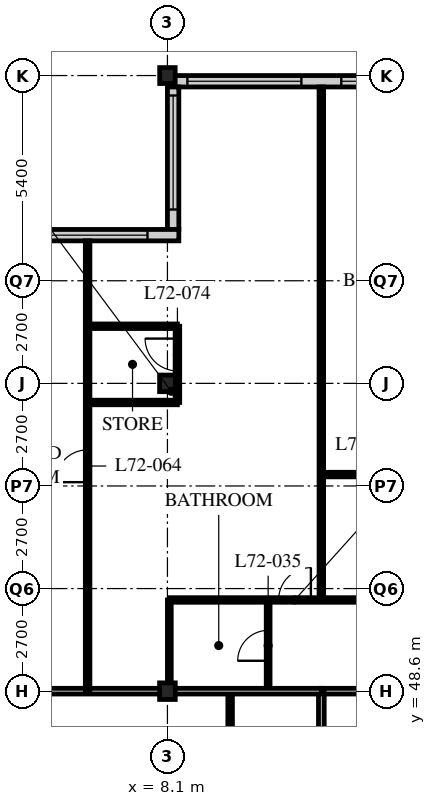
"""IFC4 building model, lengths in metres.
Left out: names, types, materials, properties, quantities, classifications, styles, units other than length and angle.
Written with IfcOpenShell. Run it as: python <this file> out.ifc"""

import sys

from ifc_helpers import new_model, si_unit, direction, frame, frame_2d, origin, origin_2d, place, context, subcontext, project, spatial, rectangle, i_section, extrude, element, fill, save


model = new_model("IFC4")
c1 = context("Model", 3, precision=1e-05, world=origin(), true_north=direction((0.0, 1.0)))
c2 = subcontext(c1, "Body", "Model", "MODEL_VIEW")
j1 = project(units=[si_unit("LENGTHUNIT", "METRE"), si_unit("PLANEANGLEUNIT", "RADIAN")], contexts=[c1])
p1 = place(None, origin())
s1 = spatial("IfcSite", under=j1, at=p1, CompositionType="ELEMENT")
p2 = place(p1, origin())
s2 = spatial("IfcBuilding", under=s1, at=p2, CompositionType="ELEMENT")
p3 = place(p2, frame((0.0, 0.0, 281.4)))
s3 = spatial("IfcBuildingStorey", under=s2, at=p3, CompositionType="ELEMENT", Elevation=281.4)
for number, where, z_axis, x_axis in (
    (1, (8.1, 48.6, 0.0), (0.0, 0.0, 1.0), (1.0, 0.0, 0.0)),
    (2, (8.1, 56.7, 0.0), (0.0, 0.0, 1.0), (1.0, 0.0, 0.0)),
):
    element("IfcColumn", number, at=place(p3, frame(where, z_axis=z_axis, x_axis=x_axis)), inside=s3, PredefinedType="COLUMN", context=c2, shape_type="SweptSolid", body=[
        extrude(i_section(OverallWidth=0.412, OverallDepth=0.437, WebThickness=0.036, FlangeThickness=0.058, FilletRadius=0.015, at=origin_2d()), origin(), (0.0, 0.0, 1.0), 3.9),
    ])
p4 = place(p3, frame((8.1, 64.8, 0.0), z_axis=(0.0, 0.0, 1.0), x_axis=(1.0, 0.0, 0.0)))
e3 = element("IfcColumn", 3, at=p4, inside=s3, PredefinedType="COLUMN", context=c2, shape_type="SweptSolid", body=[
    extrude(i_section(OverallWidth=0.407, OverallDepth=0.419, WebThickness=0.031, FlangeThickness=0.049, FilletRadius=0.015, at=origin_2d()), origin(), (0.0, 0.0, 1.0), 3.9),
])
p5 = place(p3, frame((48.3, 64.65, 0.0), z_axis=(0.0, 0.0, 1.0), x_axis=(-1.0, 0.0, 0.0)))
e4 = element("IfcWall", 4, at=p5, inside=s3, PredefinedType="SOLIDWALL", context=c2, shape_type="SweptSolid", body=[
    extrude(rectangle(XDim=40.2, YDim=0.3, at=frame_2d((20.1, 0.0))), origin(), (0.0, 0.0, 1.0), 3.69),
])
p6 = place(p5, frame((0.225, 0.0, 0.6)))
e5 = element("IfcOpeningElement", 5, at=p6, cuts=e4, PredefinedType="OPENING", context=c2, shape_type="SweptSolid", body=[
    extrude(rectangle(XDim=3.0, YDim=2.4, at=frame_2d((1.5, 1.2))), frame((0.0, 0.16, 0.0), z_axis=(0.0, -1.0, 0.0), x_axis=(1.0, 0.0, 0.0)), (0.0, 0.0, 1.0), 0.32),
])
p7 = place(p5, frame((4.275, 0.0, 0.6)))
e6 = element("IfcOpeningElement", 6, at=p7, cuts=e4, PredefinedType="OPENING", context=c2, shape_type="SweptSolid", body=[
    extrude(rectangle(XDim=3.0, YDim=2.4, at=frame_2d((1.5, 1.2))), frame((0.0, 0.16, 0.0), z_axis=(0.0, -1.0, 0.0), x_axis=(1.0, 0.0, 0.0)), (0.0, 0.0, 1.0), 0.32),
])
p8 = place(p5, frame((8.325, 0.0, 0.6)))
e7 = element("IfcOpeningElement", 7, at=p8, cuts=e4, PredefinedType="OPENING", context=c2, shape_type="SweptSolid", body=[
    extrude(rectangle(XDim=3.0, YDim=2.4, at=frame_2d((1.5, 1.2))), frame((0.0, 0.16, 0.0), z_axis=(0.0, -1.0, 0.0), x_axis=(1.0, 0.0, 0.0)), (0.0, 0.0, 1.0), 0.32),
])
p9 = place(p5, frame((12.375, 0.0, 0.6)))
e8 = element("IfcOpeningElement", 8, at=p9, cuts=e4, PredefinedType="OPENING", context=c2, shape_type="SweptSolid", body=[
    extrude(rectangle(XDim=3.0, YDim=2.4, at=frame_2d((1.5, 1.2))), frame((0.0, 0.16, 0.0), z_axis=(0.0, -1.0, 0.0), x_axis=(1.0, 0.0, 0.0)), (0.0, 0.0, 1.0), 0.32),
])
p10 = place(p5, frame((16.425, 0.0, 0.6)))
e9 = element("IfcOpeningElement", 9, at=p10, cuts=e4, PredefinedType="OPENING", context=c2, shape_type="SweptSolid", body=[
    extrude(rectangle(XDim=3.0, YDim=2.4, at=frame_2d((1.5, 1.2))), frame((0.0, 0.16, 0.0), z_axis=(0.0, -1.0, 0.0), x_axis=(1.0, 0.0, 0.0)), (0.0, 0.0, 1.0), 0.32),
])
p11 = place(p5, frame((20.475, 0.0, 0.6)))
e10 = element("IfcOpeningElement", 10, at=p11, cuts=e4, PredefinedType="OPENING", context=c2, shape_type="SweptSolid", body=[
    extrude(rectangle(XDim=3.0, YDim=2.4, at=frame_2d((1.5, 1.2))), frame((0.0, 0.16, 0.0), z_axis=(0.0, -1.0, 0.0), x_axis=(1.0, 0.0, 0.0)), (0.0, 0.0, 1.0), 0.32),
])
p12 = place(p5, frame((24.525, 0.0, 0.6)))
e11 = element("IfcOpeningElement", 11, at=p12, cuts=e4, PredefinedType="OPENING", context=c2, shape_type="SweptSolid", body=[
    extrude(rectangle(XDim=3.0, YDim=2.4, at=frame_2d((1.5, 1.2))), frame((0.0, 0.16, 0.0), z_axis=(0.0, -1.0, 0.0), x_axis=(1.0, 0.0, 0.0)), (0.0, 0.0, 1.0), 0.32),
])
p13 = place(p5, frame((28.575, 0.0, 0.6)))
e12 = element("IfcOpeningElement", 12, at=p13, cuts=e4, PredefinedType="OPENING", context=c2, shape_type="SweptSolid", body=[
    extrude(rectangle(XDim=3.0, YDim=2.4, at=frame_2d((1.5, 1.2))), frame((0.0, 0.16, 0.0), z_axis=(0.0, -1.0, 0.0), x_axis=(1.0, 0.0, 0.0)), (0.0, 0.0, 1.0), 0.32),
])
p14 = place(p5, frame((32.625, 0.0, 0.6)))
e13 = element("IfcOpeningElement", 13, at=p14, cuts=e4, PredefinedType="OPENING", context=c2, shape_type="SweptSolid", body=[
    extrude(rectangle(XDim=3.0, YDim=2.4, at=frame_2d((1.5, 1.2))), frame((0.0, 0.16, 0.0), z_axis=(0.0, -1.0, 0.0), x_axis=(1.0, 0.0, 0.0)), (0.0, 0.0, 1.0), 0.32),
])
p15 = place(p5, frame((36.675, 0.0, 0.6)))
e14 = element("IfcOpeningElement", 14, at=p15, cuts=e4, PredefinedType="OPENING", context=c2, shape_type="SweptSolid", body=[
    extrude(rectangle(XDim=3.0, YDim=2.4, at=frame_2d((1.5, 1.2))), frame((0.0, 0.16, 0.0), z_axis=(0.0, -1.0, 0.0), x_axis=(1.0, 0.0, 0.0)), (0.0, 0.0, 1.0), 0.32),
])
p16 = place(p3, frame((8.25, 64.5, 0.0), z_axis=(0.0, 0.0, 1.0), x_axis=(0.0, -1.0, 0.0)))
e15 = element("IfcWall", 15, at=p16, inside=s3, PredefinedType="SOLIDWALL", context=c2, shape_type="SweptSolid", body=[
    extrude(rectangle(XDim=3.75, YDim=0.3, at=frame_2d((1.875, 0.0))), origin(), (0.0, 0.0, 1.0), 3.69),
])
p17 = place(p16, frame((0.225, 0.0, 0.6)))
e16 = element("IfcOpeningElement", 16, at=p17, cuts=e15, PredefinedType="OPENING", context=c2, shape_type="SweptSolid", body=[
    extrude(rectangle(XDim=3.0, YDim=2.3, at=frame_2d((1.5, 1.15))), frame((0.0, 0.16, 0.0), z_axis=(0.0, -1.0, 0.0), x_axis=(1.0, 0.0, 0.0)), (0.0, 0.0, 1.0), 0.32),
])
p18 = place(p3, frame((8.4, 60.6, 0.0), z_axis=(0.0, 0.0, 1.0), x_axis=(-1.0, 0.0, 0.0)))
e17 = element("IfcWall", 17, at=p18, inside=s3, PredefinedType="SOLIDWALL", context=c2, shape_type="SweptSolid", body=[
    extrude(rectangle(XDim=4.35, YDim=0.3, at=frame_2d((2.175, 0.0))), origin(), (0.0, 0.0, 1.0), 3.69),
])
p19 = place(p18, frame((0.825, 0.0, 0.6)))
e18 = element("IfcOpeningElement", 18, at=p19, cuts=e17, PredefinedType="OPENING", context=c2, shape_type="SweptSolid", body=[
    extrude(rectangle(XDim=3.0, YDim=2.3, at=frame_2d((1.5, 1.15))), frame((0.0, 0.16, 0.0), z_axis=(0.0, -1.0, 0.0), x_axis=(1.0, 0.0, 0.0)), (0.0, 0.0, 1.0), 0.32),
])
p20 = place(p3, frame((12.15, 48.6, 0.0), z_axis=(0.0, 0.0, 1.0), x_axis=(1.0, 0.0, 0.0)))
e19 = element("IfcWall", 19, at=p20, inside=s3, PredefinedType="PARTITIONING", context=c2, shape_type="SweptSolid", body=[
    extrude(rectangle(XDim=24.3, YDim=0.15, at=frame_2d((12.15, 0.0))), origin(), (0.0, 0.0, 1.0), 3.078),
])
p21 = place(p20, frame((4.95, 0.0, 0.0)))
e20 = element("IfcOpeningElement", 20, at=p21, cuts=e19, PredefinedType="OPENING", context=c2, shape_type="SweptSolid", body=[
    extrude(rectangle(XDim=1.0, YDim=2.1, at=frame_2d((0.5, 1.05))), frame((0.0, 0.085, 0.0), z_axis=(0.0, -1.0, 0.0), x_axis=(1.0, 0.0, 0.0)), (0.0, 0.0, 1.0), 0.17),
])
p22 = place(p20, frame((16.6, 0.0, 0.0)))
e21 = element("IfcOpeningElement", 21, at=p22, cuts=e19, PredefinedType="OPENING", context=c2, shape_type="SweptSolid", body=[
    extrude(rectangle(XDim=1.0, YDim=2.1, at=frame_2d((0.5, 1.05))), frame((0.0, 0.085, 0.0), z_axis=(0.0, -1.0, 0.0), x_axis=(1.0, 0.0, 0.0)), (0.0, 0.0, 1.0), 0.17),
])
p23 = place(p20, frame((1.525, 0.0, 0.0)))
e22 = element("IfcOpeningElement", 22, at=p23, cuts=e19, PredefinedType="OPENING", context=c2, shape_type="SweptSolid", body=[
    extrude(rectangle(XDim=1.0, YDim=2.1, at=frame_2d((0.5, 1.05))), frame((0.0, 0.085, 0.0), z_axis=(0.0, -1.0, 0.0), x_axis=(1.0, 0.0, 0.0)), (0.0, 0.0, 1.0), 0.17),
])
p24 = place(p3, frame((12.15, 22.5, 0.0), z_axis=(0.0, 0.0, 1.0), x_axis=(0.0, 1.0, 0.0)))
e23 = element("IfcWall", 23, at=p24, inside=s3, PredefinedType="PARTITIONING", context=c2, shape_type="SweptSolid", body=[
    extrude(rectangle(XDim=26.1, YDim=0.15, at=frame_2d((13.05, 0.0))), origin(), (0.0, 0.0, 1.0), 3.69),
])
p25 = place(p24, frame((0.4, 0.0, 0.0)))
e24 = element("IfcOpeningElement", 24, at=p25, cuts=e23, PredefinedType="OPENING", context=c2, shape_type="SweptSolid", body=[
    extrude(rectangle(XDim=1.0, YDim=2.1, at=frame_2d((0.5, 1.05))), frame((0.0, 0.085, 0.0), z_axis=(0.0, -1.0, 0.0), x_axis=(1.0, 0.0, 0.0)), (0.0, 0.0, 1.0), 0.17),
])
p26 = place(p3, frame((9.75, 22.5, 0.0), z_axis=(0.0, 0.0, 1.0), x_axis=(0.0, 1.0, 0.0)))
e25 = element("IfcWall", 25, at=p26, inside=s3, PredefinedType="PARTITIONING", context=c2, shape_type="SweptSolid", body=[
    extrude(rectangle(XDim=26.1, YDim=0.12, at=frame_2d((13.05, 0.0))), origin(), (0.0, 0.0, 1.0), 3.69),
])
p27 = place(p26, frame((0.975, 0.0, 0.0)))
e26 = element("IfcOpeningElement", 26, at=p27, cuts=e25, PredefinedType="OPENING", context=c2, shape_type="SweptSolid", body=[
    extrude(rectangle(XDim=0.85, YDim=2.1, at=frame_2d((0.425, 1.05))), frame((0.0, 0.07, 0.0), z_axis=(0.0, -1.0, 0.0), x_axis=(1.0, 0.0, 0.0)), (0.0, 0.0, 1.0), 0.14),
])
p28 = place(p26, frame((10.225, 0.0, 0.0)))
e27 = element("IfcOpeningElement", 27, at=p28, cuts=e25, PredefinedType="OPENING", context=c2, shape_type="SweptSolid", body=[
    extrude(rectangle(XDim=0.85, YDim=2.1, at=frame_2d((0.425, 1.05))), frame((0.0, 0.07, 0.0), z_axis=(0.0, -1.0, 0.0), x_axis=(1.0, 0.0, 0.0)), (0.0, 0.0, 1.0), 0.14),
])
p29 = place(p26, frame((14.275, 0.0, 0.0)))
e28 = element("IfcOpeningElement", 28, at=p29, cuts=e25, PredefinedType="OPENING", context=c2, shape_type="SweptSolid", body=[
    extrude(rectangle(XDim=0.85, YDim=2.1, at=frame_2d((0.425, 1.05))), frame((0.0, 0.07, 0.0), z_axis=(0.0, -1.0, 0.0), x_axis=(1.0, 0.0, 0.0)), (0.0, 0.0, 1.0), 0.14),
])
p30 = place(p26, frame((18.325, 0.0, 0.0)))
e29 = element("IfcOpeningElement", 29, at=p30, cuts=e25, PredefinedType="OPENING", context=c2, shape_type="SweptSolid", body=[
    extrude(rectangle(XDim=0.85, YDim=2.1, at=frame_2d((0.425, 1.05))), frame((0.0, 0.07, 0.0), z_axis=(0.0, -1.0, 0.0), x_axis=(1.0, 0.0, 0.0)), (0.0, 0.0, 1.0), 0.14),
])
p31 = place(p26, frame((22.375, 0.0, 0.0)))
e30 = element("IfcOpeningElement", 30, at=p31, cuts=e25, PredefinedType="OPENING", context=c2, shape_type="SweptSolid", body=[
    extrude(rectangle(XDim=0.85, YDim=2.1, at=frame_2d((0.425, 1.05))), frame((0.0, 0.07, 0.0), z_axis=(0.0, -1.0, 0.0), x_axis=(1.0, 0.0, 0.0)), (0.0, 0.0, 1.0), 0.14),
])
p32 = place(p3, frame((10.75, 48.6, 0.0), z_axis=(0.0, 0.0, 1.0), x_axis=(0.0, 1.0, 0.0)))
e31 = element("IfcWall", 31, at=p32, inside=s3, PredefinedType="PARTITIONING", context=c2, shape_type="SweptSolid", body=[
    extrude(rectangle(XDim=2.4, YDim=0.1, at=frame_2d((1.2, 0.0))), origin(), (0.0, 0.0, 1.0), 3.69),
])
p33 = place(p32, frame((0.8, 0.0, 0.0)))
e32 = element("IfcOpeningElement", 32, at=p33, cuts=e31, PredefinedType="OPENING", context=c2, shape_type="SweptSolid", body=[
    extrude(rectangle(XDim=0.8, YDim=2.1, at=frame_2d((0.4, 1.05))), frame((0.0, 0.06, 0.0), z_axis=(0.0, -1.0, 0.0), x_axis=(1.0, 0.0, 0.0)), (0.0, 0.0, 1.0), 0.12),
])
p34 = place(p3, frame((8.15, 48.6, 0.0), z_axis=(0.0, 0.0, 1.0), x_axis=(0.0, 1.0, 0.0)))
e33 = element("IfcWall", 33, at=p34, inside=s3, PredefinedType="PARTITIONING", context=c2, shape_type="SweptSolid", body=[
    extrude(rectangle(XDim=2.4, YDim=0.1, at=frame_2d((1.2, 0.0))), origin(), (0.0, 0.0, 1.0), 3.078),
])
p35 = place(p3, frame((8.15, 51.0, 0.0), z_axis=(0.0, 0.0, 1.0), x_axis=(1.0, 0.0, 0.0)))
e34 = element("IfcWall", 34, at=p35, inside=s3, PredefinedType="PARTITIONING", context=c2, shape_type="SweptSolid", body=[
    extrude(rectangle(XDim=28.3, YDim=0.12, at=frame_2d((14.15, 0.0))), origin(), (0.0, 0.0, 1.0), 3.69),
])
p36 = place(p35, frame((9.025, 0.0, 0.0)))
e35 = element("IfcOpeningElement", 35, at=p36, cuts=e34, PredefinedType="OPENING", context=c2, shape_type="SweptSolid", body=[
    extrude(rectangle(XDim=0.85, YDim=2.1, at=frame_2d((0.425, 1.05))), frame((0.0, 0.07, 0.0), z_axis=(0.0, -1.0, 0.0), x_axis=(1.0, 0.0, 0.0)), (0.0, 0.0, 1.0), 0.14),
])
p37 = place(p35, frame((16.475, 0.0, 0.0)))
e36 = element("IfcOpeningElement", 36, at=p37, cuts=e34, PredefinedType="OPENING", context=c2, shape_type="SweptSolid", body=[
    extrude(rectangle(XDim=0.85, YDim=2.1, at=frame_2d((0.425, 1.05))), frame((0.0, 0.07, 0.0), z_axis=(0.0, -1.0, 0.0), x_axis=(1.0, 0.0, 0.0)), (0.0, 0.0, 1.0), 0.14),
])
p38 = place(p35, frame((21.175, 0.0, 0.0)))
e37 = element("IfcOpeningElement", 37, at=p38, cuts=e34, PredefinedType="OPENING", context=c2, shape_type="SweptSolid", body=[
    extrude(rectangle(XDim=0.85, YDim=2.1, at=frame_2d((0.425, 1.05))), frame((0.0, 0.07, 0.0), z_axis=(0.0, -1.0, 0.0), x_axis=(1.0, 0.0, 0.0)), (0.0, 0.0, 1.0), 0.14),
])
p39 = place(p35, frame((24.575, 0.0, 0.0)))
e38 = element("IfcOpeningElement", 38, at=p39, cuts=e34, PredefinedType="OPENING", context=c2, shape_type="SweptSolid", body=[
    extrude(rectangle(XDim=0.85, YDim=2.1, at=frame_2d((0.425, 1.05))), frame((0.0, 0.07, 0.0), z_axis=(0.0, -1.0, 0.0), x_axis=(1.0, 0.0, 0.0)), (0.0, 0.0, 1.0), 0.14),
])
p40 = place(p35, frame((6.725, 0.0, 0.0)))
e39 = element("IfcOpeningElement", 39, at=p40, cuts=e34, PredefinedType="OPENING", context=c2, shape_type="SweptSolid", body=[
    extrude(rectangle(XDim=0.85, YDim=2.1, at=frame_2d((0.425, 1.05))), frame((0.0, 0.07, 0.0), z_axis=(0.0, -1.0, 0.0), x_axis=(1.0, 0.0, 0.0)), (0.0, 0.0, 1.0), 0.14),
])
p41 = place(p35, frame((2.875, 0.0, 0.0)))
e40 = element("IfcOpeningElement", 40, at=p41, cuts=e34, PredefinedType="OPENING", context=c2, shape_type="SweptSolid", body=[
    extrude(rectangle(XDim=0.85, YDim=2.1, at=frame_2d((0.425, 1.05))), frame((0.0, 0.07, 0.0), z_axis=(0.0, -1.0, 0.0), x_axis=(1.0, 0.0, 0.0)), (0.0, 0.0, 1.0), 0.14),
])
p42 = place(p3, frame((12.15, 51.0, 0.0), z_axis=(0.0, 0.0, 1.0), x_axis=(0.0, 1.0, 0.0)))
e41 = element("IfcWall", 41, at=p42, inside=s3, PredefinedType="PARTITIONING", context=c2, shape_type="SweptSolid", body=[
    extrude(rectangle(XDim=13.5, YDim=0.12, at=frame_2d((6.75, 0.0))), origin(), (0.0, 0.0, 1.0), 3.69),
])
p43 = place(p3, frame((0.3, 48.6, 0.0), z_axis=(0.0, 0.0, 1.0), x_axis=(1.0, 0.0, 0.0)))
e42 = element("IfcWall", 42, at=p43, inside=s3, PredefinedType="PARTITIONING", context=c2, shape_type="SweptSolid", body=[
    extrude(rectangle(XDim=11.85, YDim=0.15, at=frame_2d((5.925, 0.0))), origin(), (0.0, 0.0, 1.0), 3.078),
])
p44 = place(p3, frame((12.15, 54.3, 0.0), z_axis=(0.0, 0.0, 1.0), x_axis=(1.0, 0.0, 0.0)))
e43 = element("IfcWall", 43, at=p44, inside=s3, PredefinedType="PARTITIONING", context=c2, shape_type="SweptSolid", body=[
    extrude(rectangle(XDim=4.05, YDim=0.12, at=frame_2d((2.025, 0.0))), origin(), (0.0, 0.0, 1.0), 3.69),
])
p45 = place(p44, frame((1.6, 0.0, 0.0)))
e44 = element("IfcOpeningElement", 44, at=p45, cuts=e43, PredefinedType="OPENING", context=c2, shape_type="SweptSolid", body=[
    extrude(rectangle(XDim=0.85, YDim=2.1, at=frame_2d((0.425, 1.05))), frame((0.0, 0.07, 0.0), z_axis=(0.0, -1.0, 0.0), x_axis=(1.0, 0.0, 0.0)), (0.0, 0.0, 1.0), 0.14),
])
p46 = place(p3, frame((6.0, 48.6, 0.0), z_axis=(0.0, 0.0, 1.0), x_axis=(0.0, 1.0, 0.0)))
e45 = element("IfcWall", 45, at=p46, inside=s3, PredefinedType="PARTITIONING", context=c2, shape_type="SweptSolid", body=[
    extrude(rectangle(XDim=11.85, YDim=0.12, at=frame_2d((5.925, 0.0))), origin(), (0.0, 0.0, 1.0), 3.69),
])
p47 = place(p46, frame((5.5, 0.0, 0.0)))
e46 = element("IfcOpeningElement", 46, at=p47, cuts=e45, PredefinedType="OPENING", context=c2, shape_type="SweptSolid", body=[
    extrude(rectangle(XDim=0.85, YDim=2.1, at=frame_2d((0.425, 1.05))), frame((0.0, 0.07, 0.0), z_axis=(0.0, -1.0, 0.0), x_axis=(1.0, 0.0, 0.0)), (0.0, 0.0, 1.0), 0.14),
])
for number, where, z_axis, x_axis in (
    (47, (6.0, 56.197, 0.0), (0.0, 0.0, 1.0), (1.0, 0.0, 0.0)),
    (48, (6.0, 58.203, 0.0), (0.0, 0.0, 1.0), (1.0, 0.0, 0.0)),
):
    element("IfcWall", number, at=place(p3, frame(where, z_axis=z_axis, x_axis=x_axis)), inside=s3, PredefinedType="PARTITIONING", context=c2, shape_type="SweptSolid", body=[
        extrude(rectangle(XDim=2.363, YDim=0.12, at=frame_2d((1.182, 0.0))), origin(), (0.0, 0.0, 1.0), 3.69),
    ])
p48 = place(p3, frame((8.363, 56.197, 0.0), z_axis=(0.0, 0.0, 1.0), x_axis=(0.0, 1.0, 0.0)))
e49 = element("IfcWall", 49, at=p48, inside=s3, PredefinedType="PARTITIONING", context=c2, shape_type="SweptSolid", body=[
    extrude(rectangle(XDim=2.006, YDim=0.12, at=frame_2d((1.003, 0.0))), origin(), (0.0, 0.0, 1.0), 3.69),
])
p49 = place(p48, frame((0.831, 0.0, 0.0)))
e50 = element("IfcOpeningElement", 50, at=p49, cuts=e49, PredefinedType="OPENING", context=c2, shape_type="SweptSolid", body=[
    extrude(rectangle(XDim=0.85, YDim=2.1, at=frame_2d((0.425, 1.05))), frame((0.0, 0.07, 0.0), z_axis=(0.0, -1.0, 0.0), x_axis=(1.0, 0.0, 0.0)), (0.0, 0.0, 1.0), 0.14),
])
p50 = place(p14, origin())
e51 = element("IfcWindow", 51, at=p50, inside=s3, PartitioningType="SINGLE_PANEL", PredefinedType="WINDOW", context=c2, shape_type="SweptSolid", body=[
    extrude(rectangle(XDim=3.0, YDim=2.4, at=frame_2d((1.5, 1.2))), frame((0.0, 0.03, 0.0), z_axis=(0.0, -1.0, 0.0), x_axis=(1.0, 0.0, 0.0)), (0.0, 0.0, 1.0), 0.06),
])
fill(e13, e51)
p51 = place(p15, origin())
e52 = element("IfcWindow", 52, at=p51, inside=s3, PartitioningType="SINGLE_PANEL", PredefinedType="WINDOW", context=c2, shape_type="SweptSolid", body=[
    extrude(rectangle(XDim=3.0, YDim=2.4, at=frame_2d((1.5, 1.2))), frame((0.0, 0.03, 0.0), z_axis=(0.0, -1.0, 0.0), x_axis=(1.0, 0.0, 0.0)), (0.0, 0.0, 1.0), 0.06),
])
fill(e14, e52)
p52 = place(p17, origin())
e53 = element("IfcWindow", 53, at=p52, inside=s3, PartitioningType="SINGLE_PANEL", PredefinedType="WINDOW", context=c2, shape_type="SweptSolid", body=[
    extrude(rectangle(XDim=3.0, YDim=2.3, at=frame_2d((1.5, 1.15))), frame((0.0, 0.03, 0.0), z_axis=(0.0, -1.0, 0.0), x_axis=(1.0, 0.0, 0.0)), (0.0, 0.0, 1.0), 0.06),
])
fill(e16, e53)
p53 = place(p19, origin())
e54 = element("IfcWindow", 54, at=p53, inside=s3, PartitioningType="SINGLE_PANEL", PredefinedType="WINDOW", context=c2, shape_type="SweptSolid", body=[
    extrude(rectangle(XDim=3.0, YDim=2.3, at=frame_2d((1.5, 1.15))), frame((0.0, 0.03, 0.0), z_axis=(0.0, -1.0, 0.0), x_axis=(1.0, 0.0, 0.0)), (0.0, 0.0, 1.0), 0.06),
])
fill(e18, e54)
p54 = place(p33, origin())
e55 = element("IfcDoor", 55, at=p54, inside=s3, OperationType="SINGLE_SWING_LEFT", PredefinedType="DOOR", context=c2, shape_type="SweptSolid", body=[
    extrude(rectangle(XDim=0.8, YDim=2.1, at=frame_2d((0.4, 1.05))), frame((0.0, 0.025, 0.0), z_axis=(0.0, -1.0, 0.0), x_axis=(1.0, 0.0, 0.0)), (0.0, 0.0, 1.0), 0.05),
])
fill(e32, e55)
p55 = place(p41, origin())
e56 = element("IfcDoor", 56, at=p55, inside=s3, OperationType="SINGLE_SWING_RIGHT", PredefinedType="DOOR", context=c2, shape_type="SweptSolid", body=[
    extrude(rectangle(XDim=0.85, YDim=2.1, at=frame_2d((0.425, 1.05))), frame((0.0, 0.025, 0.0), z_axis=(0.0, -1.0, 0.0), x_axis=(1.0, 0.0, 0.0)), (0.0, 0.0, 1.0), 0.05),
])
fill(e40, e56)
p56 = place(p47, origin())
e57 = element("IfcDoor", 57, at=p56, inside=s3, OperationType="SINGLE_SWING_LEFT", PredefinedType="DOOR", context=c2, shape_type="SweptSolid", body=[
    extrude(rectangle(XDim=0.85, YDim=2.1, at=frame_2d((0.425, 1.05))), frame((0.0, 0.025, 0.0), z_axis=(0.0, -1.0, 0.0), x_axis=(1.0, 0.0, 0.0)), (0.0, 0.0, 1.0), 0.05),
])
fill(e46, e57)
p57 = place(p49, origin())
e58 = element("IfcDoor", 58, at=p57, inside=s3, OperationType="SINGLE_SWING_RIGHT", PredefinedType="DOOR", context=c2, shape_type="SweptSolid", body=[
    extrude(rectangle(XDim=0.85, YDim=2.1, at=frame_2d((0.425, 1.05))), frame((0.0, 0.025, 0.0), z_axis=(0.0, -1.0, 0.0), x_axis=(1.0, 0.0, 0.0)), (0.0, 0.0, 1.0), 0.05),
])
fill(e50, e58)
save(model, sys.argv[1])
